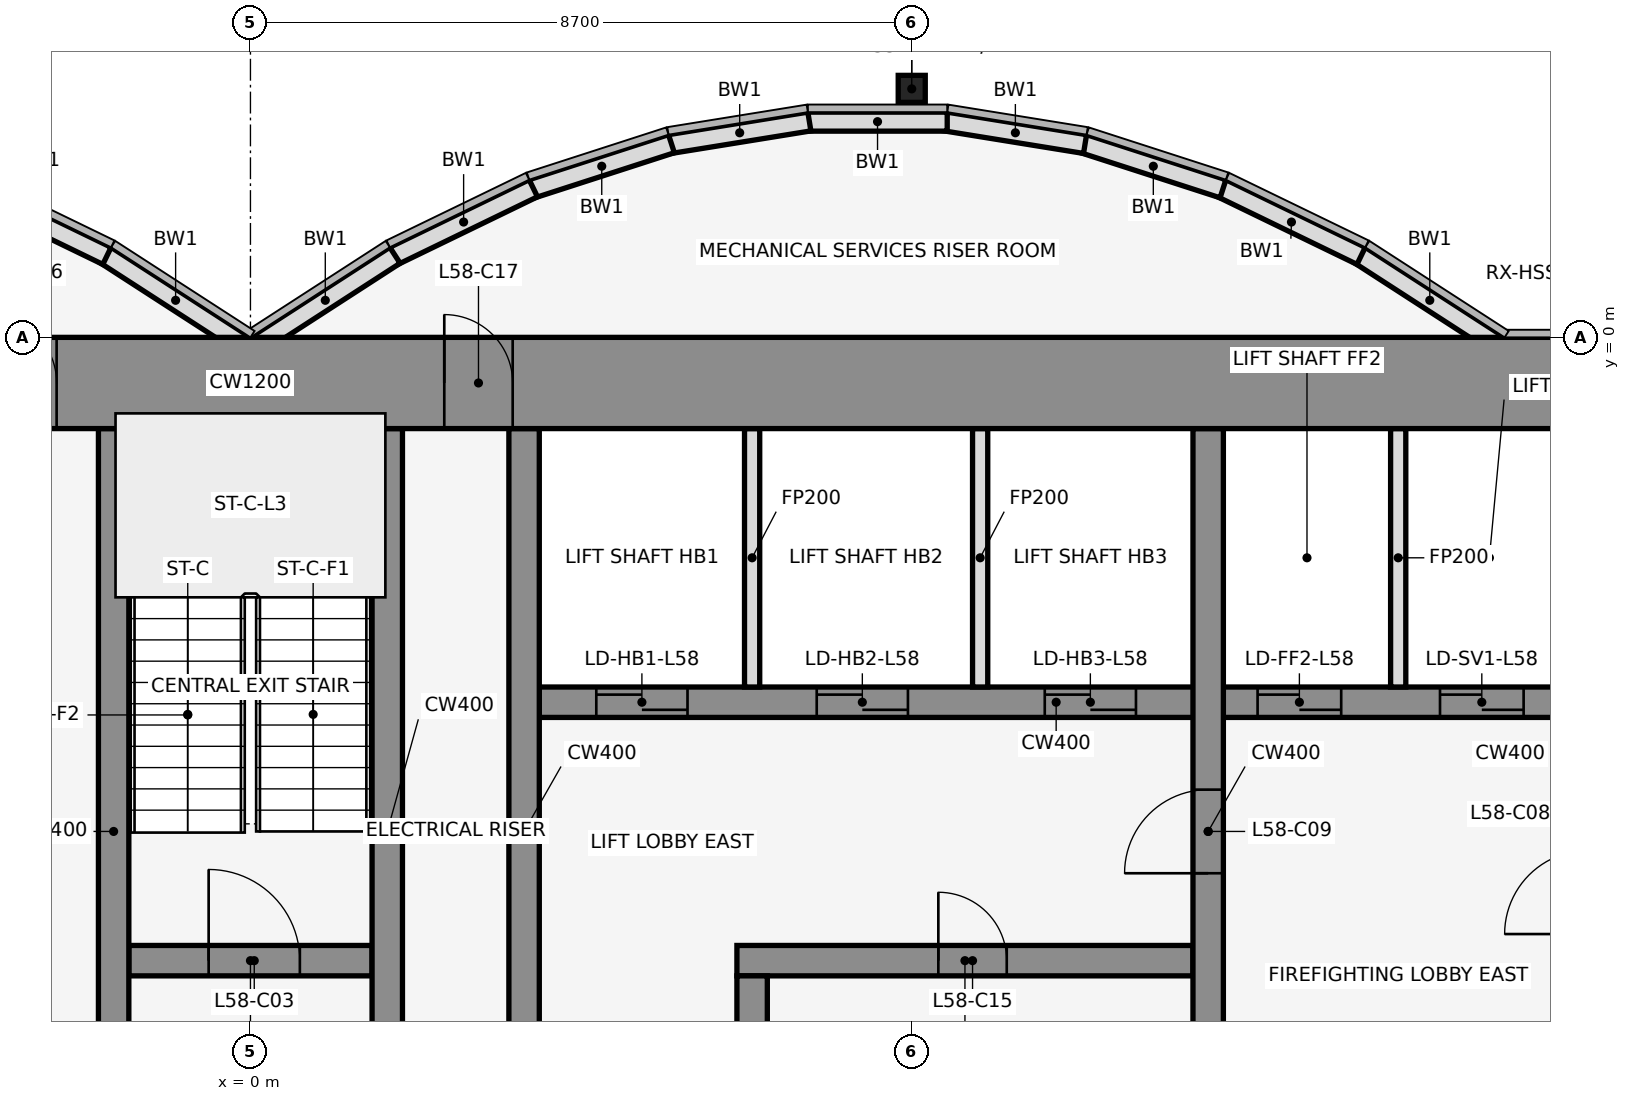
"""IFC4 building model, lengths in metres.
Left out: names, types, materials, properties, quantities, classifications, styles, units other than length and angle.
Written with IfcOpenShell. Run it as: python <this file> out.ifc"""

import sys

from ifc_helpers import new_model, si_unit, direction, frame, frame_2d, origin, origin_2d, place, context, subcontext, project, spatial, rectangle, hollow_rectangle, extrude, element, fill, save


model = new_model("IFC4")
c1 = context("Model", 3, precision=1e-05, world=origin(), true_north=direction((0.0, 1.0)))
c2 = subcontext(c1, "Body", "Model", "MODEL_VIEW")
j1 = project(units=[si_unit("LENGTHUNIT", "METRE"), si_unit("PLANEANGLEUNIT", "RADIAN")], contexts=[c1])
p1 = place(None, origin())
s1 = spatial("IfcSite", under=j1, at=p1, CompositionType="ELEMENT")
p2 = place(p1, origin())
s2 = spatial("IfcBuilding", under=s1, at=p2, CompositionType="ELEMENT")
p3 = place(p2, frame((0.0, 0.0, 258.2)))
s3 = spatial("IfcBuildingStorey", under=s2, at=p3, CompositionType="ELEMENT", Elevation=258.2)
p4 = place(p3, frame((8.7, 3.269, 0.0), z_axis=(0.0, 0.0, 1.0), x_axis=(1.0, 0.0, 0.0)))
e1 = element("IfcColumn", 1, at=p4, inside=s3, PredefinedType="COLUMN", context=c2, shape_type="SweptSolid", body=[
    extrude(hollow_rectangle(XDim=0.356, YDim=0.356, WallThickness=0.012, at=origin_2d()), origin(), (0.0, 0.0, 1.0), 4.2),
])
p5 = place(p3, frame((16.432, -0.105, 0.0), z_axis=(0.0, 0.0, 1.0), x_axis=(-0.83981312244, 0.542875602121, 0.0)))
e2 = element("IfcWall", 2, at=p5, inside=s3, PredefinedType="STANDARD", context=c2, shape_type="SweptSolid", body=[
    extrude(rectangle(XDim=2.183, YDim=0.25, at=frame_2d((1.091, 0.0))), origin(), (0.0, 0.0, 1.0), 4.05),
])
p6 = place(p3, frame((14.612, 1.073, 0.0), z_axis=(0.0, 0.0, 1.0), x_axis=(-0.89982408427, 0.436252928206, 0.0)))
e3 = element("IfcWall", 3, at=p6, inside=s3, PredefinedType="STANDARD", context=c2, shape_type="SweptSolid", body=[
    extrude(rectangle(XDim=2.038, YDim=0.25, at=frame_2d((1.019, 0.0))), origin(), (0.0, 0.0, 1.0), 4.05),
])
p7 = place(p3, frame((12.795, 1.955, 0.0), z_axis=(0.0, 0.0, 1.0), x_axis=(-0.951495806175, 0.307661714928, 0.0)))
e4 = element("IfcWall", 4, at=p7, inside=s3, PredefinedType="STANDARD", context=c2, shape_type="SweptSolid", body=[
    extrude(rectangle(XDim=1.927, YDim=0.25, at=frame_2d((0.963, 0.0))), origin(), (0.0, 0.0, 1.0), 4.05),
])
p8 = place(p3, frame((10.98, 2.543, 0.0), z_axis=(0.0, 0.0, 1.0), x_axis=(-0.987181718931, 0.159600293885, 0.0)))
e5 = element("IfcWall", 5, at=p8, inside=s3, PredefinedType="STANDARD", context=c2, shape_type="SweptSolid", body=[
    extrude(rectangle(XDim=1.857, YDim=0.25, at=frame_2d((0.929, 0.0))), origin(), (0.0, 0.0, 1.0), 4.05),
])
p9 = place(p3, frame((9.167, 2.838, 0.0), z_axis=(0.0, 0.0, 1.0), x_axis=(-1.0, 0.0, 0.0)))
e6 = element("IfcWall", 6, at=p9, inside=s3, PredefinedType="STANDARD", context=c2, shape_type="SweptSolid", body=[
    extrude(rectangle(XDim=1.833, YDim=0.25, at=frame_2d((0.917, 0.0))), origin(), (0.0, 0.0, 1.0), 4.05),
])
p10 = place(p3, frame((7.353, 2.84, 0.0), z_axis=(0.0, 0.0, 1.0), x_axis=(-0.987181718931, -0.159600293885, 0.0)))
e7 = element("IfcWall", 7, at=p10, inside=s3, PredefinedType="STANDARD", context=c2, shape_type="SweptSolid", body=[
    extrude(rectangle(XDim=1.857, YDim=0.25, at=frame_2d((0.929, 0.0))), origin(), (0.0, 0.0, 1.0), 4.05),
])
p11 = place(p3, frame((5.538, 2.548, 0.0), z_axis=(0.0, 0.0, 1.0), x_axis=(-0.951495806175, -0.307661714928, 0.0)))
e8 = element("IfcWall", 8, at=p11, inside=s3, PredefinedType="STANDARD", context=c2, shape_type="SweptSolid", body=[
    extrude(rectangle(XDim=1.927, YDim=0.25, at=frame_2d((0.963, 0.0))), origin(), (0.0, 0.0, 1.0), 4.05),
])
p12 = place(p3, frame((3.721, 1.962, 0.0), z_axis=(0.0, 0.0, 1.0), x_axis=(-0.89982408427, -0.436252928206, 0.0)))
e9 = element("IfcWall", 9, at=p12, inside=s3, PredefinedType="STANDARD", context=c2, shape_type="SweptSolid", body=[
    extrude(rectangle(XDim=2.038, YDim=0.25, at=frame_2d((1.019, 0.0))), origin(), (0.0, 0.0, 1.0), 4.05),
])
for number, where, z_axis, x_axis in (
    (10, (1.901, 1.08, 0.0), (0.0, 0.0, 1.0), (-0.84, -0.543, 0.0)),
    (11, (-0.068, -0.105, 0.0), (0.0, 0.0, 1.0), (-0.84, 0.543, 0.0)),
):
    element("IfcWall", number, at=place(p3, frame(where, z_axis=z_axis, x_axis=x_axis)), inside=s3, PredefinedType="STANDARD", context=c2, shape_type="SweptSolid", body=[
        extrude(rectangle(XDim=2.183, YDim=0.25, at=frame_2d((1.091, 0.0))), origin(), (0.0, 0.0, 1.0), 4.05),
    ])
p13 = place(p3, frame((-1.888, 1.073, 0.0), z_axis=(0.0, 0.0, 1.0), x_axis=(-0.89982408427, 0.436252928206, 0.0)))
e12 = element("IfcWall", 12, at=p13, inside=s3, PredefinedType="STANDARD", context=c2, shape_type="SweptSolid", body=[
    extrude(rectangle(XDim=2.038, YDim=0.25, at=frame_2d((1.019, 0.0))), origin(), (0.0, 0.0, 1.0), 4.05),
])
p14 = place(p3, frame((-1.6, -8.2, 0.0), z_axis=(0.0, 0.0, 1.0), x_axis=(1.0, 0.0, 0.0)))
e13 = element("IfcWall", 13, at=p14, inside=s3, PredefinedType="SHEAR", context=c2, shape_type="SweptSolid", body=[
    extrude(rectangle(XDim=3.2, YDim=0.4, at=frame_2d((1.6, 0.0))), origin(), (0.0, 0.0, 1.0), 4.2),
])
p15 = place(p14, frame((1.05, 0.0, 0.0)))
e14 = element("IfcOpeningElement", 14, at=p15, cuts=e13, PredefinedType="OPENING", context=c2, shape_type="SweptSolid", body=[
    extrude(rectangle(XDim=1.2, YDim=2.1, at=frame_2d((0.6, 1.05))), frame((0.0, 0.212, 0.0), z_axis=(0.0, -1.0, 0.0), x_axis=(1.0, 0.0, 0.0)), (0.0, 0.0, 1.0), 0.424),
])
p16 = place(p3, frame((6.4, -8.2, 0.0), z_axis=(0.0, 0.0, 1.0), x_axis=(1.0, 0.0, 0.0)))
e15 = element("IfcWall", 15, at=p16, inside=s3, PredefinedType="SHEAR", context=c2, shape_type="SweptSolid", body=[
    extrude(rectangle(XDim=6.0, YDim=0.4, at=frame_2d((3.0, 0.0))), origin(), (0.0, 0.0, 1.0), 4.2),
])
p17 = place(p16, frame((2.65, 0.0, 0.0)))
e16 = element("IfcOpeningElement", 16, at=p17, cuts=e15, PredefinedType="OPENING", context=c2, shape_type="SweptSolid", body=[
    extrude(rectangle(XDim=0.9, YDim=2.1, at=frame_2d((0.45, 1.05))), frame((0.0, 0.212, 0.0), z_axis=(0.0, -1.0, 0.0), x_axis=(1.0, 0.0, 0.0)), (0.0, 0.0, 1.0), 0.424),
])
p18 = place(p3, frame((3.8, -4.8, 0.0), z_axis=(0.0, 0.0, 1.0), x_axis=(1.0, 0.0, 0.0)))
e17 = element("IfcWall", 17, at=p18, inside=s3, PredefinedType="SHEAR", context=c2, shape_type="SweptSolid", body=[
    extrude(rectangle(XDim=13.6, YDim=0.4, at=frame_2d((6.8, 0.0))), origin(), (0.0, 0.0, 1.0), 4.2),
])
p19 = place(p18, frame((0.75, 0.0, 0.0)))
e18 = element("IfcOpeningElement", 18, at=p19, cuts=e17, PredefinedType="OPENING", context=c2, shape_type="SweptSolid", body=[
    extrude(rectangle(XDim=1.2, YDim=2.1, at=frame_2d((0.6, 1.05))), frame((0.0, 0.212, 0.0), z_axis=(0.0, -1.0, 0.0), x_axis=(1.0, 0.0, 0.0)), (0.0, 0.0, 1.0), 0.424),
])
p20 = place(p18, frame((3.65, 0.0, 0.0)))
e19 = element("IfcOpeningElement", 19, at=p20, cuts=e17, PredefinedType="OPENING", context=c2, shape_type="SweptSolid", body=[
    extrude(rectangle(XDim=1.2, YDim=2.1, at=frame_2d((0.6, 1.05))), frame((0.0, 0.212, 0.0), z_axis=(0.0, -1.0, 0.0), x_axis=(1.0, 0.0, 0.0)), (0.0, 0.0, 1.0), 0.424),
])
p21 = place(p18, frame((6.65, 0.0, 0.0)))
e20 = element("IfcOpeningElement", 20, at=p21, cuts=e17, PredefinedType="OPENING", context=c2, shape_type="SweptSolid", body=[
    extrude(rectangle(XDim=1.2, YDim=2.1, at=frame_2d((0.6, 1.05))), frame((0.0, 0.212, 0.0), z_axis=(0.0, -1.0, 0.0), x_axis=(1.0, 0.0, 0.0)), (0.0, 0.0, 1.0), 0.424),
])
p22 = place(p18, frame((9.45, 0.0, 0.0)))
e21 = element("IfcOpeningElement", 21, at=p22, cuts=e17, PredefinedType="OPENING", context=c2, shape_type="SweptSolid", body=[
    extrude(rectangle(XDim=1.1, YDim=2.1, at=frame_2d((0.55, 1.05))), frame((0.0, 0.212, 0.0), z_axis=(0.0, -1.0, 0.0), x_axis=(1.0, 0.0, 0.0)), (0.0, 0.0, 1.0), 0.424),
])
p23 = place(p18, frame((11.85, 0.0, 0.0)))
e22 = element("IfcOpeningElement", 22, at=p23, cuts=e17, PredefinedType="OPENING", context=c2, shape_type="SweptSolid", body=[
    extrude(rectangle(XDim=1.1, YDim=2.1, at=frame_2d((0.55, 1.05))), frame((0.0, 0.212, 0.0), z_axis=(0.0, -1.0, 0.0), x_axis=(1.0, 0.0, 0.0)), (0.0, 0.0, 1.0), 0.424),
])
for number, where, z_axis, x_axis in (
    (23, (-1.8, -11.8, 0.0), (0.0, 0.0, 1.0), (0.0, 1.0, 0.0)),
    (24, (1.8, -11.8, 0.0), (0.0, 0.0, 1.0), (0.0, 1.0, 0.0)),
):
    element("IfcWall", number, at=place(p3, frame(where, z_axis=z_axis, x_axis=x_axis)), inside=s3, PredefinedType="SHEAR", context=c2, shape_type="SweptSolid", body=[
        extrude(rectangle(XDim=10.6, YDim=0.4, at=frame_2d((5.3, 0.0))), origin(), (0.0, 0.0, 1.0), 4.2),
    ])
p24 = place(p3, frame((3.6, -11.8, 0.0), z_axis=(0.0, 0.0, 1.0), x_axis=(0.0, 1.0, 0.0)))
e25 = element("IfcWall", 25, at=p24, inside=s3, PredefinedType="SHEAR", context=c2, shape_type="SweptSolid", body=[
    extrude(rectangle(XDim=10.6, YDim=0.4, at=frame_2d((5.3, 0.0))), origin(), (0.0, 0.0, 1.0), 4.2),
])
p25 = place(p24, frame((1.35, 0.0, 0.0)))
e26 = element("IfcOpeningElement", 26, at=p25, cuts=e25, PredefinedType="OPENING", context=c2, shape_type="SweptSolid", body=[
    extrude(rectangle(XDim=0.9, YDim=2.1, at=frame_2d((0.45, 1.05))), frame((0.0, 0.212, 0.0), z_axis=(0.0, -1.0, 0.0), x_axis=(1.0, 0.0, 0.0)), (0.0, 0.0, 1.0), 0.424),
])
p26 = place(p3, frame((6.6, -11.8, 0.0), z_axis=(0.0, 0.0, 1.0), x_axis=(0.0, 1.0, 0.0)))
e27 = element("IfcWall", 27, at=p26, inside=s3, PredefinedType="SHEAR", context=c2, shape_type="SweptSolid", body=[
    extrude(rectangle(XDim=3.4, YDim=0.4, at=frame_2d((1.7, 0.0))), origin(), (0.0, 0.0, 1.0), 4.2),
])
for number, where, z_axis, x_axis in (
    (28, (6.6, -4.6, 0.0), (0.0, 0.0, 1.0), (0.0, 1.0, 0.0)),
    (29, (9.6, -4.6, 0.0), (0.0, 0.0, 1.0), (0.0, 1.0, 0.0)),
):
    element("IfcWall", number, at=place(p3, frame(where, z_axis=z_axis, x_axis=x_axis)), inside=s3, PredefinedType="PARTITIONING", context=c2, shape_type="SweptSolid", body=[
        extrude(rectangle(XDim=3.4, YDim=0.2, at=frame_2d((1.7, 0.0))), origin(), (0.0, 0.0, 1.0), 3.118),
    ])
p27 = place(p3, frame((12.6, -11.8, 0.0), z_axis=(0.0, 0.0, 1.0), x_axis=(0.0, 1.0, 0.0)))
e30 = element("IfcWall", 30, at=p27, inside=s3, PredefinedType="SHEAR", context=c2, shape_type="SweptSolid", body=[
    extrude(rectangle(XDim=10.6, YDim=0.4, at=frame_2d((5.3, 0.0))), origin(), (0.0, 0.0, 1.0), 4.2),
])
p28 = place(p27, frame((4.75, 0.0, 0.0)))
e31 = element("IfcOpeningElement", 31, at=p28, cuts=e30, PredefinedType="OPENING", context=c2, shape_type="SweptSolid", body=[
    extrude(rectangle(XDim=1.1, YDim=2.1, at=frame_2d((0.55, 1.05))), frame((0.0, 0.212, 0.0), z_axis=(0.0, -1.0, 0.0), x_axis=(1.0, 0.0, 0.0)), (0.0, 0.0, 1.0), 0.424),
])
p29 = place(p3, frame((15.1, -4.6, 0.0), z_axis=(0.0, 0.0, 1.0), x_axis=(0.0, 1.0, 0.0)))
e32 = element("IfcWall", 32, at=p29, inside=s3, PredefinedType="PARTITIONING", context=c2, shape_type="SweptSolid", body=[
    extrude(rectangle(XDim=3.4, YDim=0.2, at=frame_2d((1.7, 0.0))), origin(), (0.0, 0.0, 1.0), 3.118),
])
p30 = place(p3, frame((-22.0, -0.6, 0.0), z_axis=(0.0, 0.0, 1.0), x_axis=(1.0, 0.0, 0.0)))
e33 = element("IfcWall", 33, at=p30, inside=s3, PredefinedType="SHEAR", context=c2, shape_type="SweptSolid", body=[
    extrude(rectangle(XDim=44.0, YDim=1.2, at=frame_2d((22.0, 0.0))), origin(), (0.0, 0.0, 1.0), 4.2),
])
p31 = place(p30, frame((18.55, 0.0, 0.0)))
e34 = element("IfcOpeningElement", 34, at=p31, cuts=e33, PredefinedType="OPENING", context=c2, shape_type="SweptSolid", body=[
    extrude(rectangle(XDim=0.9, YDim=2.1, at=frame_2d((0.45, 1.05))), frame((0.0, 0.612, 0.0), z_axis=(0.0, -1.0, 0.0), x_axis=(1.0, 0.0, 0.0)), (0.0, 0.0, 1.0), 1.224),
])
p32 = place(p30, frame((24.55, 0.0, 0.0)))
e35 = element("IfcOpeningElement", 35, at=p32, cuts=e33, PredefinedType="OPENING", context=c2, shape_type="SweptSolid", body=[
    extrude(rectangle(XDim=0.9, YDim=2.1, at=frame_2d((0.45, 1.05))), frame((0.0, 0.612, 0.0), z_axis=(0.0, -1.0, 0.0), x_axis=(1.0, 0.0, 0.0)), (0.0, 0.0, 1.0), 1.224),
])
p33 = place(p15, origin())
e36 = element("IfcDoor", 36, at=p33, inside=s3, OperationType="SINGLE_SWING_LEFT", PredefinedType="DOOR", context=c2, shape_type="SweptSolid", body=[
    extrude(rectangle(XDim=1.2, YDim=2.1, at=frame_2d((0.6, 1.05))), frame((0.0, 0.025, 0.0), z_axis=(0.0, -1.0, 0.0), x_axis=(1.0, 0.0, 0.0)), (0.0, 0.0, 1.0), 0.05),
])
fill(e14, e36)
p34 = place(p19, origin())
e37 = element("IfcDoor", 37, at=p34, inside=s3, OperationType="DOUBLE_DOOR_SLIDING", PredefinedType="DOOR", context=c2, shape_type="SweptSolid", body=[
    extrude(rectangle(XDim=1.2, YDim=2.1, at=frame_2d((0.6, 1.05))), frame((0.0, 0.025, 0.0), z_axis=(0.0, -1.0, 0.0), x_axis=(1.0, 0.0, 0.0)), (0.0, 0.0, 1.0), 0.05),
])
fill(e18, e37)
p35 = place(p20, origin())
e38 = element("IfcDoor", 38, at=p35, inside=s3, OperationType="DOUBLE_DOOR_SLIDING", PredefinedType="DOOR", context=c2, shape_type="SweptSolid", body=[
    extrude(rectangle(XDim=1.2, YDim=2.1, at=frame_2d((0.6, 1.05))), frame((0.0, 0.025, 0.0), z_axis=(0.0, -1.0, 0.0), x_axis=(1.0, 0.0, 0.0)), (0.0, 0.0, 1.0), 0.05),
])
fill(e19, e38)
p36 = place(p21, origin())
e39 = element("IfcDoor", 39, at=p36, inside=s3, OperationType="DOUBLE_DOOR_SLIDING", PredefinedType="DOOR", context=c2, shape_type="SweptSolid", body=[
    extrude(rectangle(XDim=1.2, YDim=2.1, at=frame_2d((0.6, 1.05))), frame((0.0, 0.025, 0.0), z_axis=(0.0, -1.0, 0.0), x_axis=(1.0, 0.0, 0.0)), (0.0, 0.0, 1.0), 0.05),
])
fill(e20, e39)
p37 = place(p22, origin())
e40 = element("IfcDoor", 40, at=p37, inside=s3, OperationType="DOUBLE_DOOR_SLIDING", PredefinedType="DOOR", context=c2, shape_type="SweptSolid", body=[
    extrude(rectangle(XDim=1.1, YDim=2.1, at=frame_2d((0.55, 1.05))), frame((0.0, 0.025, 0.0), z_axis=(0.0, -1.0, 0.0), x_axis=(1.0, 0.0, 0.0)), (0.0, 0.0, 1.0), 0.05),
])
fill(e21, e40)
p38 = place(p23, origin())
e41 = element("IfcDoor", 41, at=p38, inside=s3, OperationType="DOUBLE_DOOR_SLIDING", PredefinedType="DOOR", context=c2, shape_type="SweptSolid", body=[
    extrude(rectangle(XDim=1.1, YDim=2.1, at=frame_2d((0.55, 1.05))), frame((0.0, 0.025, 0.0), z_axis=(0.0, -1.0, 0.0), x_axis=(1.0, 0.0, 0.0)), (0.0, 0.0, 1.0), 0.05),
])
fill(e22, e41)
p39 = place(p28, frame((1.1, 0.0, 0.0), z_axis=(0.0, 0.0, 1.0), x_axis=(-1.0, 0.0, 0.0)))
e42 = element("IfcDoor", 42, at=p39, inside=s3, OperationType="SINGLE_SWING_RIGHT", PredefinedType="DOOR", context=c2, shape_type="SweptSolid", body=[
    extrude(rectangle(XDim=1.1, YDim=2.1, at=frame_2d((0.55, 1.05))), frame((0.0, 0.025, 0.0), z_axis=(0.0, -1.0, 0.0), x_axis=(1.0, 0.0, 0.0)), (0.0, 0.0, 1.0), 0.05),
])
fill(e31, e42)
p40 = place(p17, frame((0.9, 0.0, 0.0), z_axis=(0.0, 0.0, 1.0), x_axis=(-1.0, 0.0, 0.0)))
e43 = element("IfcDoor", 43, at=p40, inside=s3, OperationType="SINGLE_SWING_RIGHT", PredefinedType="DOOR", context=c2, shape_type="SweptSolid", body=[
    extrude(rectangle(XDim=0.9, YDim=2.1, at=frame_2d((0.45, 1.05))), frame((0.0, 0.025, 0.0), z_axis=(0.0, -1.0, 0.0), x_axis=(1.0, 0.0, 0.0)), (0.0, 0.0, 1.0), 0.05),
])
fill(e16, e43)
p41 = place(p31, origin())
e44 = element("IfcDoor", 44, at=p41, inside=s3, OperationType="SINGLE_SWING_LEFT", PredefinedType="DOOR", context=c2, shape_type="SweptSolid", body=[
    extrude(rectangle(XDim=0.9, YDim=2.1, at=frame_2d((0.45, 1.05))), frame((0.0, 0.025, 0.0), z_axis=(0.0, -1.0, 0.0), x_axis=(1.0, 0.0, 0.0)), (0.0, 0.0, 1.0), 0.05),
])
fill(e34, e44)
p42 = place(p32, origin())
e45 = element("IfcDoor", 45, at=p42, inside=s3, OperationType="SINGLE_SWING_LEFT", PredefinedType="DOOR", context=c2, shape_type="SweptSolid", body=[
    extrude(rectangle(XDim=0.9, YDim=2.1, at=frame_2d((0.45, 1.05))), frame((0.0, 0.025, 0.0), z_axis=(0.0, -1.0, 0.0), x_axis=(1.0, 0.0, 0.0)), (0.0, 0.0, 1.0), 0.05),
])
fill(e35, e45)
save(model, sys.argv[1])
